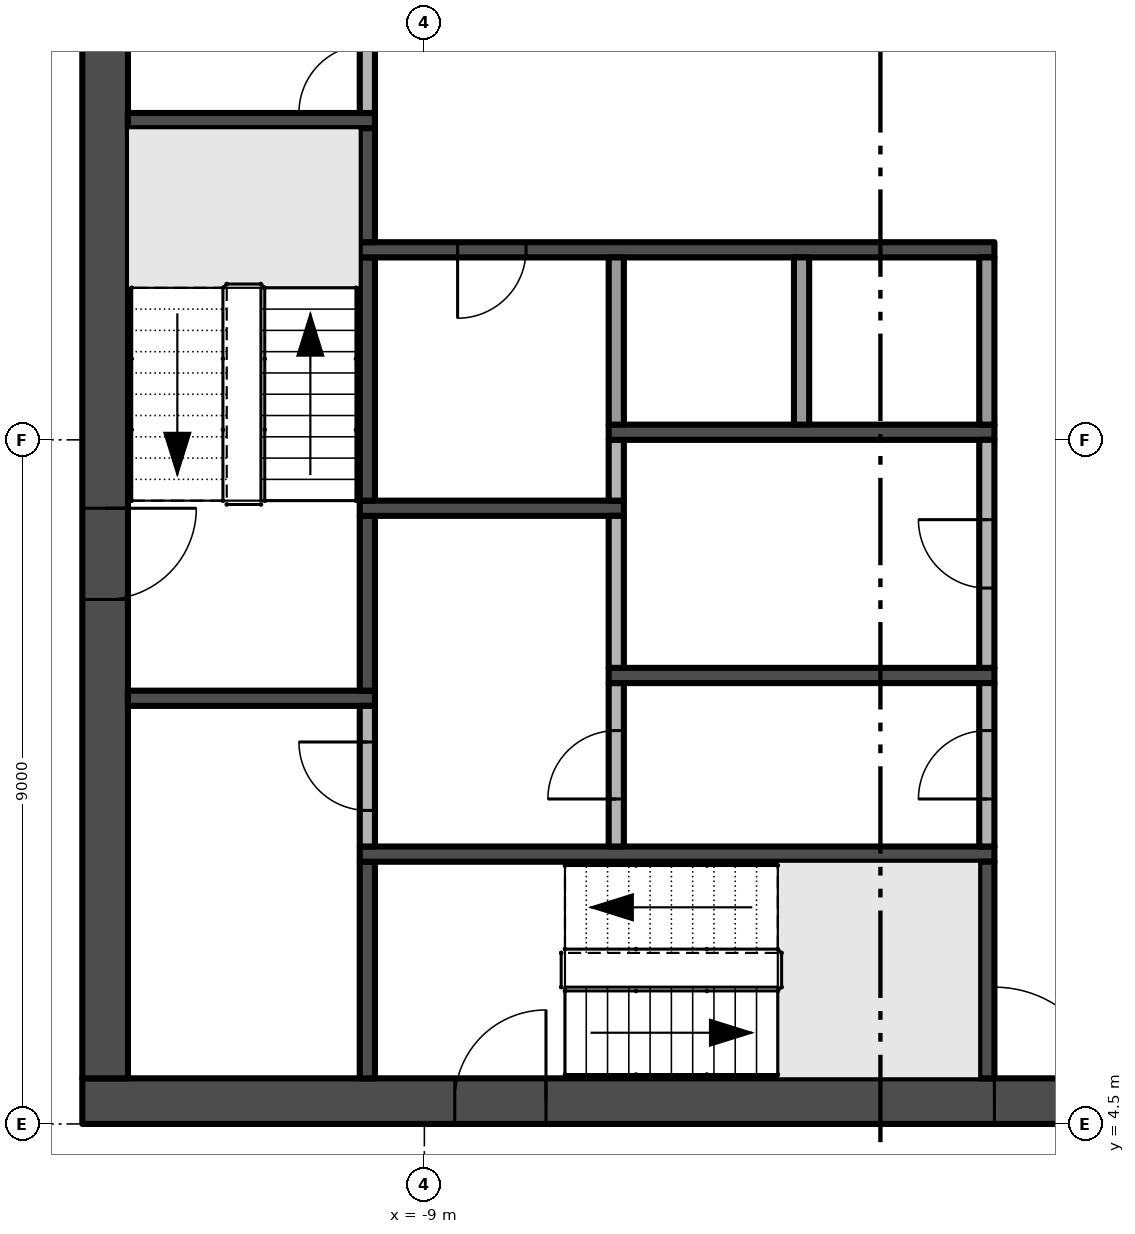
"""IFC4 building model, lengths in metres.
Left out: names, types, materials, properties, quantities, classifications, styles, units other than length and angle.
Written with IfcOpenShell. Run it as: python <this file> out.ifc"""

import sys

from ifc_helpers import new_model, si_unit, direction, frame, frame_2d, origin, place, context, subcontext, project, spatial, rectangle, extrude, element, fill, save


model = new_model("IFC4")
c1 = context("Model", 3, precision=1e-05, world=origin(), true_north=direction((0.0, 1.0)))
c2 = subcontext(c1, "Body", "Model", "MODEL_VIEW")
j1 = project(units=[si_unit("LENGTHUNIT", "METRE"), si_unit("PLANEANGLEUNIT", "RADIAN")], contexts=[c1])
p1 = place(None, origin())
s1 = spatial("IfcSite", under=j1, at=p1, CompositionType="ELEMENT")
p2 = place(p1, origin())
s2 = spatial("IfcBuilding", under=s1, at=p2, CompositionType="ELEMENT")
p3 = place(p2, frame((0.0, 0.0, 203.4)))
s3 = spatial("IfcBuildingStorey", under=s2, at=p3, CompositionType="ELEMENT", Elevation=203.4)
p4 = place(p3, frame((-13.5, 4.8, -0.3), z_axis=(0.0, 0.0, 1.0), x_axis=(1.0, 0.0, 0.0)))
e1 = element("IfcWall", 1, at=p4, inside=s3, PredefinedType="SHEAR", context=c2, shape_type="SweptSolid", body=[
    extrude(rectangle(XDim=27.0, YDim=0.6, at=frame_2d((13.5, 0.0))), origin(), (0.0, 0.0, 1.0), 3.8),
])
p5 = place(p4, frame((12.0, 0.0, 0.3)))
e2 = element("IfcOpeningElement", 2, at=p5, cuts=e1, PredefinedType="OPENING", context=c2, shape_type="SweptSolid", body=[
    extrude(rectangle(XDim=3.0, YDim=2.4, at=frame_2d((1.5, 1.2))), frame((0.0, 0.31, 0.0), z_axis=(0.0, -1.0, 0.0), x_axis=(1.0, 0.0, 0.0)), (0.0, 0.0, 1.0), 0.62),
])
p6 = place(p4, frame((4.9, 0.0, 0.3)))
e3 = element("IfcOpeningElement", 3, at=p6, cuts=e1, PredefinedType="OPENING", context=c2, shape_type="SweptSolid", body=[
    extrude(rectangle(XDim=1.2, YDim=2.2, at=frame_2d((0.6, 1.1))), frame((0.0, 0.31, 0.0), z_axis=(0.0, -1.0, 0.0), x_axis=(1.0, 0.0, 0.0)), (0.0, 0.0, 1.0), 0.62),
])
p7 = place(p4, frame((20.75, 0.0, 0.3)))
e4 = element("IfcOpeningElement", 4, at=p7, cuts=e1, PredefinedType="OPENING", context=c2, shape_type="SweptSolid", body=[
    extrude(rectangle(XDim=1.5, YDim=2.2, at=frame_2d((0.75, 1.1))), frame((0.0, 0.31, 0.0), z_axis=(0.0, -1.0, 0.0), x_axis=(1.0, 0.0, 0.0)), (0.0, 0.0, 1.0), 0.62),
])
p8 = place(p4, frame((17.4, 0.0, 0.3)))
e5 = element("IfcOpeningElement", 5, at=p8, cuts=e1, PredefinedType="OPENING", context=c2, shape_type="SweptSolid", body=[
    extrude(rectangle(XDim=1.2, YDim=2.2, at=frame_2d((0.6, 1.1))), frame((0.0, 0.31, 0.0), z_axis=(0.0, -1.0, 0.0), x_axis=(1.0, 0.0, 0.0)), (0.0, 0.0, 1.0), 0.62),
])
p9 = place(p3, frame((-13.2, 21.9, -0.3), z_axis=(0.0, 0.0, 1.0), x_axis=(0.0, -1.0, 0.0)))
e6 = element("IfcWall", 6, at=p9, inside=s3, PredefinedType="SHEAR", context=c2, shape_type="SweptSolid", body=[
    extrude(rectangle(XDim=16.8, YDim=0.6, at=frame_2d((8.4, 0.0))), origin(), (0.0, 0.0, 1.0), 3.8),
])
p10 = place(p9, frame((9.3, 0.0, 0.3)))
e7 = element("IfcOpeningElement", 7, at=p10, cuts=e6, PredefinedType="OPENING", context=c2, shape_type="SweptSolid", body=[
    extrude(rectangle(XDim=1.2, YDim=2.2, at=frame_2d((0.6, 1.1))), frame((0.0, 0.31, 0.0), z_axis=(0.0, -1.0, 0.0), x_axis=(1.0, 0.0, 0.0)), (0.0, 0.0, 1.0), 0.62),
])
for number, where, z_axis, x_axis in (
    (8, (-12.9, 10.1, 0.0), (0.0, 0.0, 1.0), (1.0, 0.0, 0.0)),
    (9, (-12.9, 17.7, 0.0), (0.0, 0.0, 1.0), (1.0, 0.0, 0.0)),
):
    element("IfcWall", number, at=place(p3, frame(where, z_axis=z_axis, x_axis=x_axis)), inside=s3, PredefinedType="SHEAR", context=c2, shape_type="SweptSolid", body=[
        extrude(rectangle(XDim=3.25, YDim=0.2, at=frame_2d((1.625, 0.0))), origin(), (0.0, 0.0, 1.0), 3.5),
    ])
p11 = place(p3, frame((-9.75, 5.1, 0.0), z_axis=(0.0, 0.0, 1.0), x_axis=(0.0, 1.0, 0.0)))
e10 = element("IfcWall", 10, at=p11, inside=s3, PredefinedType="SHEAR", context=c2, shape_type="SweptSolid", body=[
    extrude(rectangle(XDim=2.85, YDim=0.2, at=frame_2d((1.425, 0.0))), origin(), (0.0, 0.0, 1.0), 3.5),
])
p12 = place(p3, frame((-9.85, 8.05, 0.0), z_axis=(0.0, 0.0, 1.0), x_axis=(1.0, 0.0, 0.0)))
e11 = element("IfcWall", 11, at=p12, inside=s3, PredefinedType="SHEAR", context=c2, shape_type="SweptSolid", body=[
    extrude(rectangle(XDim=8.35, YDim=0.2, at=frame_2d((4.175, 0.0))), origin(), (0.0, 0.0, 1.0), 3.5),
])
p13 = place(p3, frame((-9.75, 8.15, 0.0), z_axis=(0.0, 0.0, 1.0), x_axis=(0.0, 1.0, 0.0)))
e12 = element("IfcWall", 12, at=p13, inside=s3, PredefinedType="PARTITIONING", context=c2, shape_type="SweptSolid", body=[
    extrude(rectangle(XDim=1.85, YDim=0.2, at=frame_2d((0.925, 0.0))), origin(), (0.0, 0.0, 1.0), 3.5),
])
p14 = place(p13, frame((0.475, 0.0, 0.0)))
e13 = element("IfcOpeningElement", 13, at=p14, cuts=e12, PredefinedType="OPENING", context=c2, shape_type="SweptSolid", body=[
    extrude(rectangle(XDim=0.9, YDim=2.1, at=frame_2d((0.45, 1.05))), frame((0.0, 0.11, 0.0), z_axis=(0.0, -1.0, 0.0), x_axis=(1.0, 0.0, 0.0)), (0.0, 0.0, 1.0), 0.22),
])
p15 = place(p3, frame((-9.75, 10.2, 0.0), z_axis=(0.0, 0.0, 1.0), x_axis=(0.0, 1.0, 0.0)))
e14 = element("IfcWall", 14, at=p15, inside=s3, PredefinedType="SHEAR", context=c2, shape_type="SweptSolid", body=[
    extrude(rectangle(XDim=2.3, YDim=0.2, at=frame_2d((1.15, 0.0))), origin(), (0.0, 0.0, 1.0), 3.5),
])
p16 = place(p3, frame((-9.85, 12.6, 0.0), z_axis=(0.0, 0.0, 1.0), x_axis=(1.0, 0.0, 0.0)))
e15 = element("IfcWall", 15, at=p16, inside=s3, PredefinedType="SHEAR", context=c2, shape_type="SweptSolid", body=[
    extrude(rectangle(XDim=3.475, YDim=0.2, at=frame_2d((1.738, 0.0))), origin(), (0.0, 0.0, 1.0), 3.5),
])
p17 = place(p3, frame((-9.75, 12.7, 0.0), z_axis=(0.0, 0.0, 1.0), x_axis=(0.0, 1.0, 0.0)))
e16 = element("IfcWall", 16, at=p17, inside=s3, PredefinedType="SHEAR", context=c2, shape_type="SweptSolid", body=[
    extrude(rectangle(XDim=3.2, YDim=0.2, at=frame_2d((1.6, 0.0))), origin(), (0.0, 0.0, 1.0), 3.5),
])
p18 = place(p3, frame((-1.5, 16.0, 0.0), z_axis=(0.0, 0.0, 1.0), x_axis=(-1.0, 0.0, 0.0)))
e17 = element("IfcWall", 17, at=p18, inside=s3, PredefinedType="SHEAR", context=c2, shape_type="SweptSolid", body=[
    extrude(rectangle(XDim=8.35, YDim=0.2, at=frame_2d((4.175, 0.0))), origin(), (0.0, 0.0, 1.0), 3.5),
])
p19 = place(p18, frame((6.162, 0.0, 0.0)))
e18 = element("IfcOpeningElement", 18, at=p19, cuts=e17, PredefinedType="OPENING", context=c2, shape_type="SweptSolid", body=[
    extrude(rectangle(XDim=0.9, YDim=2.1, at=frame_2d((0.45, 1.05))), frame((0.0, 0.11, 0.0), z_axis=(0.0, -1.0, 0.0), x_axis=(1.0, 0.0, 0.0)), (0.0, 0.0, 1.0), 0.22),
])
p20 = place(p3, frame((-9.75, 16.1, 0.0), z_axis=(0.0, 0.0, 1.0), x_axis=(0.0, 1.0, 0.0)))
e19 = element("IfcWall", 19, at=p20, inside=s3, PredefinedType="SHEAR", context=c2, shape_type="SweptSolid", body=[
    extrude(rectangle(XDim=1.5, YDim=0.2, at=frame_2d((0.75, 0.0))), origin(), (0.0, 0.0, 1.0), 3.5),
])
p21 = place(p3, frame((-9.75, 17.8, 0.0), z_axis=(0.0, 0.0, 1.0), x_axis=(0.0, 1.0, 0.0)))
e20 = element("IfcWall", 20, at=p21, inside=s3, PredefinedType="PARTITIONING", context=c2, shape_type="SweptSolid", body=[
    extrude(rectangle(XDim=1.4, YDim=0.2, at=frame_2d((0.7, 0.0))), origin(), (0.0, 0.0, 1.0), 3.5),
])
p22 = place(p21, origin())
e21 = element("IfcOpeningElement", 21, at=p22, cuts=e20, PredefinedType="OPENING", context=c2, shape_type="SweptSolid", body=[
    extrude(rectangle(XDim=0.9, YDim=2.1, at=frame_2d((0.45, 1.05))), frame((0.0, 0.11, 0.0), z_axis=(0.0, -1.0, 0.0), x_axis=(1.0, 0.0, 0.0)), (0.0, 0.0, 1.0), 0.22),
])
p23 = place(p3, frame((-6.475, 8.15, 0.0), z_axis=(0.0, 0.0, 1.0), x_axis=(0.0, 1.0, 0.0)))
e22 = element("IfcWall", 22, at=p23, inside=s3, PredefinedType="PARTITIONING", context=c2, shape_type="SweptSolid", body=[
    extrude(rectangle(XDim=2.15, YDim=0.2, at=frame_2d((1.075, 0.0))), origin(), (0.0, 0.0, 1.0), 3.5),
])
p24 = place(p23, frame((0.625, 0.0, 0.0)))
e23 = element("IfcOpeningElement", 23, at=p24, cuts=e22, PredefinedType="OPENING", context=c2, shape_type="SweptSolid", body=[
    extrude(rectangle(XDim=0.9, YDim=2.1, at=frame_2d((0.45, 1.05))), frame((0.0, 0.11, 0.0), z_axis=(0.0, -1.0, 0.0), x_axis=(1.0, 0.0, 0.0)), (0.0, 0.0, 1.0), 0.22),
])
p25 = place(p3, frame((-6.575, 10.4, 0.0), z_axis=(0.0, 0.0, 1.0), x_axis=(1.0, 0.0, 0.0)))
e24 = element("IfcWall", 24, at=p25, inside=s3, PredefinedType="SHEAR", context=c2, shape_type="SweptSolid", body=[
    extrude(rectangle(XDim=5.075, YDim=0.2, at=frame_2d((2.538, 0.0))), origin(), (0.0, 0.0, 1.0), 3.5),
])
p26 = place(p3, frame((-6.475, 10.5, 0.0), z_axis=(0.0, 0.0, 1.0), x_axis=(0.0, 1.0, 0.0)))
e25 = element("IfcWall", 25, at=p26, inside=s3, PredefinedType="PARTITIONING", context=c2, shape_type="SweptSolid", body=[
    extrude(rectangle(XDim=2.0, YDim=0.2, at=frame_2d((1.0, 0.0))), origin(), (0.0, 0.0, 1.0), 3.5),
])
p27 = place(p3, frame((-6.475, 12.7, 0.0), z_axis=(0.0, 0.0, 1.0), x_axis=(0.0, 1.0, 0.0)))
e26 = element("IfcWall", 26, at=p27, inside=s3, PredefinedType="PARTITIONING", context=c2, shape_type="SweptSolid", body=[
    extrude(rectangle(XDim=0.8, YDim=0.2, at=frame_2d((0.4, 0.0))), origin(), (0.0, 0.0, 1.0), 3.5),
])
p28 = place(p3, frame((-6.575, 13.6, 0.0), z_axis=(0.0, 0.0, 1.0), x_axis=(1.0, 0.0, 0.0)))
e27 = element("IfcWall", 27, at=p28, inside=s3, PredefinedType="SHEAR", context=c2, shape_type="SweptSolid", body=[
    extrude(rectangle(XDim=5.075, YDim=0.2, at=frame_2d((2.538, 0.0))), origin(), (0.0, 0.0, 1.0), 3.5),
])
for number, where, z_axis, x_axis in (
    (28, (-6.475, 13.7, 0.0), (0.0, 0.0, 1.0), (0.0, 1.0, 0.0)),
    (29, (-4.037, 13.7, 0.0), (0.0, 0.0, 1.0), (0.0, 1.0, 0.0)),
):
    element("IfcWall", number, at=place(p3, frame(where, z_axis=z_axis, x_axis=x_axis)), inside=s3, PredefinedType="PARTITIONING", context=c2, shape_type="SweptSolid", body=[
        extrude(rectangle(XDim=2.2, YDim=0.2, at=frame_2d((1.1, 0.0))), origin(), (0.0, 0.0, 1.0), 3.5),
    ])
p29 = place(p3, frame((-1.6, 5.1, 0.0), z_axis=(0.0, 0.0, 1.0), x_axis=(0.0, 1.0, 0.0)))
e30 = element("IfcWall", 30, at=p29, inside=s3, PredefinedType="SHEAR", context=c2, shape_type="SweptSolid", body=[
    extrude(rectangle(XDim=2.85, YDim=0.2, at=frame_2d((1.425, 0.0))), origin(), (0.0, 0.0, 1.0), 3.5),
])
p30 = place(p3, frame((-1.6, 8.15, 0.0), z_axis=(0.0, 0.0, 1.0), x_axis=(0.0, 1.0, 0.0)))
e31 = element("IfcWall", 31, at=p30, inside=s3, PredefinedType="PARTITIONING", context=c2, shape_type="SweptSolid", body=[
    extrude(rectangle(XDim=2.15, YDim=0.2, at=frame_2d((1.075, 0.0))), origin(), (0.0, 0.0, 1.0), 3.5),
])
p31 = place(p30, frame((0.625, 0.0, 0.0)))
e32 = element("IfcOpeningElement", 32, at=p31, cuts=e31, PredefinedType="OPENING", context=c2, shape_type="SweptSolid", body=[
    extrude(rectangle(XDim=0.9, YDim=2.1, at=frame_2d((0.45, 1.05))), frame((0.0, 0.11, 0.0), z_axis=(0.0, -1.0, 0.0), x_axis=(1.0, 0.0, 0.0)), (0.0, 0.0, 1.0), 0.22),
])
p32 = place(p3, frame((-1.6, 10.5, 0.0), z_axis=(0.0, 0.0, 1.0), x_axis=(0.0, 1.0, 0.0)))
e33 = element("IfcWall", 33, at=p32, inside=s3, PredefinedType="PARTITIONING", context=c2, shape_type="SweptSolid", body=[
    extrude(rectangle(XDim=3.0, YDim=0.2, at=frame_2d((1.5, 0.0))), origin(), (0.0, 0.0, 1.0), 3.5),
])
p33 = place(p32, frame((1.05, 0.0, 0.0)))
e34 = element("IfcOpeningElement", 34, at=p33, cuts=e33, PredefinedType="OPENING", context=c2, shape_type="SweptSolid", body=[
    extrude(rectangle(XDim=0.9, YDim=2.1, at=frame_2d((0.45, 1.05))), frame((0.0, 0.11, 0.0), z_axis=(0.0, -1.0, 0.0), x_axis=(1.0, 0.0, 0.0)), (0.0, 0.0, 1.0), 0.22),
])
p34 = place(p3, frame((-1.6, 13.7, 0.0), z_axis=(0.0, 0.0, 1.0), x_axis=(0.0, 1.0, 0.0)))
e35 = element("IfcWall", 35, at=p34, inside=s3, PredefinedType="PARTITIONING", context=c2, shape_type="SweptSolid", body=[
    extrude(rectangle(XDim=2.2, YDim=0.2, at=frame_2d((1.1, 0.0))), origin(), (0.0, 0.0, 1.0), 3.5),
])
p35 = place(p5, frame((3.0, 0.0, 0.0), z_axis=(0.0, 0.0, 1.0), x_axis=(-1.0, 0.0, 0.0)))
e36 = element("IfcDoor", 36, at=p35, inside=s3, OperationType="DOUBLE_DOOR_SINGLE_SWING", PredefinedType="DOOR", context=c2, shape_type="SweptSolid", body=[
    extrude(rectangle(XDim=3.0, YDim=2.4, at=frame_2d((1.5, 1.2))), frame((0.0, 0.025, 0.0), z_axis=(0.0, -1.0, 0.0), x_axis=(1.0, 0.0, 0.0)), (0.0, 0.0, 1.0), 0.05),
])
fill(e2, e36)
p36 = place(p10, frame((1.2, 0.0, 0.0), z_axis=(0.0, 0.0, 1.0), x_axis=(-1.0, 0.0, 0.0)))
e37 = element("IfcDoor", 37, at=p36, inside=s3, OperationType="SINGLE_SWING_RIGHT", PredefinedType="DOOR", context=c2, shape_type="SweptSolid", body=[
    extrude(rectangle(XDim=1.2, YDim=2.2, at=frame_2d((0.6, 1.1))), frame((0.0, 0.025, 0.0), z_axis=(0.0, -1.0, 0.0), x_axis=(1.0, 0.0, 0.0)), (0.0, 0.0, 1.0), 0.05),
])
fill(e7, e37)
p37 = place(p6, frame((1.2, 0.0, 0.0), z_axis=(0.0, 0.0, 1.0), x_axis=(-1.0, 0.0, 0.0)))
e38 = element("IfcDoor", 38, at=p37, inside=s3, OperationType="SINGLE_SWING_LEFT", PredefinedType="DOOR", context=c2, shape_type="SweptSolid", body=[
    extrude(rectangle(XDim=1.2, YDim=2.2, at=frame_2d((0.6, 1.1))), frame((0.0, 0.025, 0.0), z_axis=(0.0, -1.0, 0.0), x_axis=(1.0, 0.0, 0.0)), (0.0, 0.0, 1.0), 0.05),
])
fill(e3, e38)
p38 = place(p19, origin())
e39 = element("IfcDoor", 39, at=p38, inside=s3, OperationType="SINGLE_SWING_RIGHT", PredefinedType="DOOR", context=c2, shape_type="SweptSolid", body=[
    extrude(rectangle(XDim=0.9, YDim=2.1, at=frame_2d((0.45, 1.05))), frame((0.0, 0.025, 0.0), z_axis=(0.0, -1.0, 0.0), x_axis=(1.0, 0.0, 0.0)), (0.0, 0.0, 1.0), 0.05),
])
fill(e18, e39)
p39 = place(p31, origin())
e40 = element("IfcDoor", 40, at=p39, inside=s3, OperationType="SINGLE_SWING_LEFT", PredefinedType="DOOR", context=c2, shape_type="SweptSolid", body=[
    extrude(rectangle(XDim=0.9, YDim=2.1, at=frame_2d((0.45, 1.05))), frame((0.0, 0.025, 0.0), z_axis=(0.0, -1.0, 0.0), x_axis=(1.0, 0.0, 0.0)), (0.0, 0.0, 1.0), 0.05),
])
fill(e32, e40)
p40 = place(p33, origin())
e41 = element("IfcDoor", 41, at=p40, inside=s3, OperationType="SINGLE_SWING_RIGHT", PredefinedType="DOOR", context=c2, shape_type="SweptSolid", body=[
    extrude(rectangle(XDim=0.9, YDim=2.1, at=frame_2d((0.45, 1.05))), frame((0.0, 0.025, 0.0), z_axis=(0.0, -1.0, 0.0), x_axis=(1.0, 0.0, 0.0)), (0.0, 0.0, 1.0), 0.05),
])
fill(e34, e41)
p41 = place(p22, origin())
e42 = element("IfcDoor", 42, at=p41, inside=s3, OperationType="SINGLE_SWING_LEFT", PredefinedType="DOOR", context=c2, shape_type="SweptSolid", body=[
    extrude(rectangle(XDim=0.9, YDim=2.1, at=frame_2d((0.45, 1.05))), frame((0.0, 0.025, 0.0), z_axis=(0.0, -1.0, 0.0), x_axis=(1.0, 0.0, 0.0)), (0.0, 0.0, 1.0), 0.05),
])
fill(e21, e42)
p42 = place(p24, origin())
e43 = element("IfcDoor", 43, at=p42, inside=s3, OperationType="SINGLE_SWING_LEFT", PredefinedType="DOOR", context=c2, shape_type="SweptSolid", body=[
    extrude(rectangle(XDim=0.9, YDim=2.1, at=frame_2d((0.45, 1.05))), frame((0.0, 0.025, 0.0), z_axis=(0.0, -1.0, 0.0), x_axis=(1.0, 0.0, 0.0)), (0.0, 0.0, 1.0), 0.05),
])
fill(e23, e43)
p43 = place(p14, origin())
e44 = element("IfcDoor", 44, at=p43, inside=s3, OperationType="SINGLE_SWING_RIGHT", PredefinedType="DOOR", context=c2, shape_type="SweptSolid", body=[
    extrude(rectangle(XDim=0.9, YDim=2.1, at=frame_2d((0.45, 1.05))), frame((0.0, 0.025, 0.0), z_axis=(0.0, -1.0, 0.0), x_axis=(1.0, 0.0, 0.0)), (0.0, 0.0, 1.0), 0.05),
])
fill(e13, e44)
save(model, sys.argv[1])
